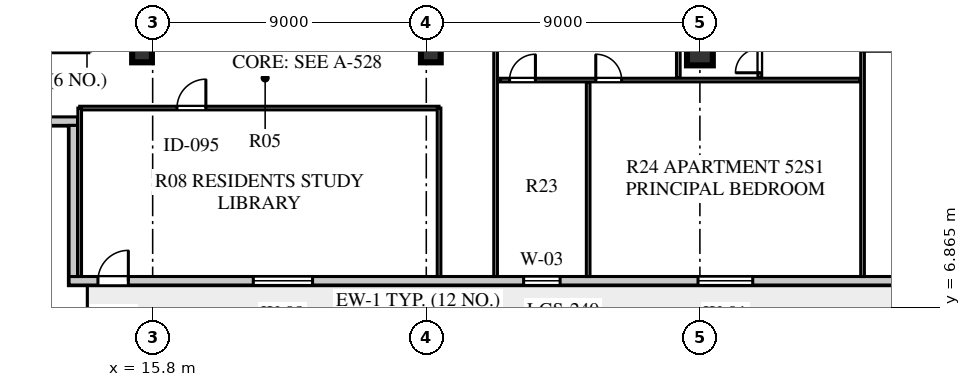
"""IFC4 building model, lengths in metres.
Left out: names, types, materials, properties, quantities, classifications, styles, units other than length and angle.
Written with IfcOpenShell. Run it as: python <this file> out.ifc"""

import sys

from ifc_helpers import new_model, si_unit, direction, frame, frame_2d, origin, origin_2d, place, context, subcontext, project, spatial, rectangle, extrude, element, fill, save


model = new_model("IFC4")
c1 = context("Model", 3, precision=1e-05, world=origin(), true_north=direction((0.0, 1.0)))
c2 = subcontext(c1, "Body", "Model", "MODEL_VIEW")
j1 = project(units=[si_unit("LENGTHUNIT", "METRE"), si_unit("PLANEANGLEUNIT", "RADIAN")], contexts=[c1])
p1 = place(None, origin())
s1 = spatial("IfcSite", under=j1, at=p1, CompositionType="ELEMENT")
p2 = place(p1, origin())
s2 = spatial("IfcBuilding", under=s1, at=p2, CompositionType="ELEMENT")
p3 = place(p2, frame((0.0, 0.0, 214.1)))
s3 = spatial("IfcBuildingStorey", under=s2, at=p3, CompositionType="ELEMENT", Elevation=214.1)
for number, where, z_axis, x_axis in (
    (1, (15.45, 15.25, 0.0), (0.0, 0.0, 1.0), (1.0, 0.0, 0.0)),
    (2, (24.95, 15.25, 0.0), (0.0, 0.0, 1.0), (1.0, 0.0, 0.0)),
):
    element("IfcColumn", number, at=place(p3, frame(where, z_axis=z_axis, x_axis=x_axis)), inside=s3, PredefinedType="COLUMN", context=c2, shape_type="SweptSolid", body=[
        extrude(rectangle(XDim=0.65, YDim=0.65, at=origin_2d()), origin(), (0.0, 0.0, 1.0), 3.66),
    ])
p4 = place(p3, frame((33.8, 15.25, 0.0), z_axis=(0.0, 0.0, 1.0), x_axis=(1.0, 0.0, 0.0)))
e3 = element("IfcColumn", 3, at=p4, inside=s3, PredefinedType="COLUMN", context=c2, shape_type="SweptSolid", body=[
    extrude(rectangle(XDim=0.85, YDim=0.85, at=origin_2d()), origin(), (0.0, 0.0, 1.0), 3.66),
])
p5 = place(p3, frame((13.05, 7.74, 0.0), z_axis=(0.0, 0.0, 1.0), x_axis=(1.0, 0.0, 0.0)))
e4 = element("IfcWall", 4, at=p5, inside=s3, PredefinedType="STANDARD", context=c2, shape_type="SweptSolid", body=[
    extrude(rectangle(XDim=32.5, YDim=0.28, at=frame_2d((16.25, 0.0))), origin(), (0.0, 0.0, 1.0), 3.66),
])
p6 = place(p5, frame((0.95, 0.0, 0.0)))
e5 = element("IfcOpeningElement", 5, at=p6, cuts=e4, PredefinedType="OPENING", context=c2, shape_type="SweptSolid", body=[
    extrude(rectangle(XDim=1.0, YDim=2.05, at=frame_2d((0.5, 1.025))), frame((0.0, 0.15, 0.0), z_axis=(0.0, -1.0, 0.0), x_axis=(1.0, 0.0, 0.0)), (0.0, 0.0, 1.0), 0.3),
])
p7 = place(p5, frame((6.06, 0.0, 0.8)))
e6 = element("IfcOpeningElement", 6, at=p7, cuts=e4, PredefinedType="OPENING", context=c2, shape_type="SweptSolid", body=[
    extrude(rectangle(XDim=1.95, YDim=2.0, at=frame_2d((0.975, 1.0))), frame((0.0, 0.15, 0.0), z_axis=(0.0, -1.0, 0.0), x_axis=(1.0, 0.0, 0.0)), (0.0, 0.0, 1.0), 0.3),
])
p8 = place(p5, frame((14.952, 0.0, 0.8)))
e7 = element("IfcOpeningElement", 7, at=p8, cuts=e4, PredefinedType="OPENING", context=c2, shape_type="SweptSolid", body=[
    extrude(rectangle(XDim=1.2, YDim=1.75, at=frame_2d((0.6, 0.875))), frame((0.0, 0.15, 0.0), z_axis=(0.0, -1.0, 0.0), x_axis=(1.0, 0.0, 0.0)), (0.0, 0.0, 1.0), 0.3),
])
p9 = place(p5, frame((20.688, 0.0, 0.8)))
e8 = element("IfcOpeningElement", 8, at=p9, cuts=e4, PredefinedType="OPENING", context=c2, shape_type="SweptSolid", body=[
    extrude(rectangle(XDim=1.8, YDim=2.0, at=frame_2d((0.9, 1.0))), frame((0.0, 0.15, 0.0), z_axis=(0.0, -1.0, 0.0), x_axis=(1.0, 0.0, 0.0)), (0.0, 0.0, 1.0), 0.3),
])
p10 = place(p5, frame((28.495, 0.0, 0.8)))
e9 = element("IfcOpeningElement", 9, at=p10, cuts=e4, PredefinedType="OPENING", context=c2, shape_type="SweptSolid", body=[
    extrude(rectangle(XDim=1.5, YDim=2.0, at=frame_2d((0.75, 1.0))), frame((0.0, 0.15, 0.0), z_axis=(0.0, -1.0, 0.0), x_axis=(1.0, 0.0, 0.0)), (0.0, 0.0, 1.0), 0.3),
])
p11 = place(p3, frame((7.8, 12.99, 0.0), z_axis=(0.0, 0.0, 1.0), x_axis=(1.0, 0.0, 0.0)))
e10 = element("IfcWall", 10, at=p11, inside=s3, PredefinedType="STANDARD", context=c2, shape_type="SweptSolid", body=[
    extrude(rectangle(XDim=5.53, YDim=0.28, at=frame_2d((2.765, 0.0))), origin(), (0.0, 0.0, 1.0), 3.66),
])
p12 = place(p3, frame((13.19, 12.85, 0.0), z_axis=(0.0, 0.0, 1.0), x_axis=(0.0, -1.0, 0.0)))
e11 = element("IfcWall", 11, at=p12, inside=s3, PredefinedType="STANDARD", context=c2, shape_type="SweptSolid", body=[
    extrude(rectangle(XDim=4.97, YDim=0.28, at=frame_2d((2.485, 0.0))), origin(), (0.0, 0.0, 1.0), 3.66),
])
p13 = place(p3, frame((27.08, 7.88, 0.0), z_axis=(0.0, 0.0, 1.0), x_axis=(0.0, 1.0, 0.0)))
e12 = element("IfcWall", 12, at=p13, inside=s3, PredefinedType="PARTITIONING", context=c2, shape_type="SweptSolid", body=[
    extrude(rectangle(XDim=13.54, YDim=0.12, at=frame_2d((6.77, 0.0))), origin(), (0.0, 0.0, 1.0), 3.66),
])
p14 = place(p3, frame((13.4, 13.42, 0.0), z_axis=(0.0, 0.0, 1.0), x_axis=(1.0, 0.0, 0.0)))
e13 = element("IfcWall", 13, at=p14, inside=s3, PredefinedType="PARTITIONING", context=c2, shape_type="SweptSolid", body=[
    extrude(rectangle(XDim=11.82, YDim=0.12, at=frame_2d((5.91, 0.0))), origin(), (0.0, 0.0, 1.0), 3.66),
])
p15 = place(p14, frame((3.2, 0.0, 0.0)))
e14 = element("IfcOpeningElement", 14, at=p15, cuts=e13, PredefinedType="OPENING", context=c2, shape_type="SweptSolid", body=[
    extrude(rectangle(XDim=0.95, YDim=2.08, at=frame_2d((0.475, 1.04))), frame((0.0, 0.07, 0.0), z_axis=(0.0, -1.0, 0.0), x_axis=(1.0, 0.0, 0.0)), (0.0, 0.0, 1.0), 0.14),
])
p16 = place(p3, frame((13.4, 7.88, 0.0), z_axis=(0.0, 0.0, 1.0), x_axis=(0.0, 1.0, 0.0)))
e15 = element("IfcWall", 15, at=p16, inside=s3, PredefinedType="PARTITIONING", context=c2, shape_type="SweptSolid", body=[
    extrude(rectangle(XDim=5.54, YDim=0.12, at=frame_2d((2.77, 0.0))), origin(), (0.0, 0.0, 1.0), 3.66),
])
p17 = place(p3, frame((25.22, 7.88, 0.0), z_axis=(0.0, 0.0, 1.0), x_axis=(0.0, 1.0, 0.0)))
e16 = element("IfcWall", 16, at=p17, inside=s3, PredefinedType="PARTITIONING", context=c2, shape_type="SweptSolid", body=[
    extrude(rectangle(XDim=5.54, YDim=0.12, at=frame_2d((2.77, 0.0))), origin(), (0.0, 0.0, 1.0), 3.21),
])
p18 = place(p3, frame((8.08, 15.3, 0.0), z_axis=(0.0, 0.0, 1.0), x_axis=(1.0, 0.0, 0.0)))
e17 = element("IfcWall", 17, at=p18, inside=s3, PredefinedType="PARTITIONING", context=c2, shape_type="SweptSolid", body=[
    extrude(rectangle(XDim=5.62, YDim=0.12, at=frame_2d((2.81, 0.0))), origin(), (0.0, 0.0, 1.0), 3.21),
])
p19 = place(p3, frame((39.15, 7.88, 0.0), z_axis=(0.0, 0.0, 1.0), x_axis=(0.0, 1.0, 0.0)))
e18 = element("IfcWall", 18, at=p19, inside=s3, PredefinedType="PARTITIONING", context=c2, shape_type="SweptSolid", body=[
    extrude(rectangle(XDim=13.54, YDim=0.12, at=frame_2d((6.77, 0.0))), origin(), (0.0, 0.0, 1.0), 3.66),
])
p20 = place(p3, frame((27.24, 14.341, 0.0), z_axis=(0.0, 0.0, 1.0), x_axis=(1.0, 0.0, 0.0)))
e19 = element("IfcWall", 19, at=p20, inside=s3, PredefinedType="PARTITIONING", context=c2, shape_type="SweptSolid", body=[
    extrude(rectangle(XDim=11.83, YDim=0.12, at=frame_2d((5.915, 0.0))), origin(), (0.0, 0.0, 1.0), 3.66),
])
p21 = place(p20, frame((0.3, 0.0, 0.0)))
e20 = element("IfcOpeningElement", 20, at=p21, cuts=e19, PredefinedType="OPENING", context=c2, shape_type="SweptSolid", body=[
    extrude(rectangle(XDim=0.85, YDim=2.08, at=frame_2d((0.425, 1.04))), frame((0.0, 0.07, 0.0), z_axis=(0.0, -1.0, 0.0), x_axis=(1.0, 0.0, 0.0)), (0.0, 0.0, 1.0), 0.14),
])
p22 = place(p20, frame((3.135, 0.0, 0.0)))
e21 = element("IfcOpeningElement", 21, at=p22, cuts=e19, PredefinedType="OPENING", context=c2, shape_type="SweptSolid", body=[
    extrude(rectangle(XDim=0.85, YDim=2.08, at=frame_2d((0.425, 1.04))), frame((0.0, 0.07, 0.0), z_axis=(0.0, -1.0, 0.0), x_axis=(1.0, 0.0, 0.0)), (0.0, 0.0, 1.0), 0.14),
])
p23 = place(p3, frame((35.77, 14.421, 0.0), z_axis=(0.0, 0.0, 1.0), x_axis=(0.0, 1.0, 0.0)))
e22 = element("IfcWall", 22, at=p23, inside=s3, PredefinedType="PLUMBINGWALL", context=c2, shape_type="SweptSolid", body=[
    extrude(rectangle(XDim=6.919, YDim=0.125, at=frame_2d((3.459, 0.0))), origin(), (0.0, 0.0, 1.0), 3.66),
])
p24 = place(p23, frame((0.16, 0.0, 0.0)))
e23 = element("IfcOpeningElement", 23, at=p24, cuts=e22, PredefinedType="OPENING", context=c2, shape_type="SweptSolid", body=[
    extrude(rectangle(XDim=0.8, YDim=2.05, at=frame_2d((0.4, 1.025))), frame((0.0, 0.073, 0.0), z_axis=(0.0, -1.0, 0.0), x_axis=(1.0, 0.0, 0.0)), (0.0, 0.0, 1.0), 0.145),
])
p25 = place(p23, frame((3.601, 0.0, 0.0)))
e24 = element("IfcOpeningElement", 24, at=p25, cuts=e22, PredefinedType="OPENING", context=c2, shape_type="SweptSolid", body=[
    extrude(rectangle(XDim=0.85, YDim=2.08, at=frame_2d((0.425, 1.04))), frame((0.0, 0.073, 0.0), z_axis=(0.0, -1.0, 0.0), x_axis=(1.0, 0.0, 0.0)), (0.0, 0.0, 1.0), 0.145),
])
p26 = place(p3, frame((33.09, 14.421, 0.0), z_axis=(0.0, 0.0, 1.0), x_axis=(0.0, 1.0, 0.0)))
e25 = element("IfcWall", 25, at=p26, inside=s3, PredefinedType="PARTITIONING", context=c2, shape_type="SweptSolid", body=[
    extrude(rectangle(XDim=6.919, YDim=0.12, at=frame_2d((3.459, 0.0))), origin(), (0.0, 0.0, 1.0), 3.66),
])
p27 = place(p26, frame((1.45, 0.0, 0.0)))
e26 = element("IfcOpeningElement", 26, at=p27, cuts=e25, PredefinedType="OPENING", context=c2, shape_type="SweptSolid", body=[
    extrude(rectangle(XDim=0.85, YDim=2.08, at=frame_2d((0.425, 1.04))), frame((0.0, 0.07, 0.0), z_axis=(0.0, -1.0, 0.0), x_axis=(1.0, 0.0, 0.0)), (0.0, 0.0, 1.0), 0.14),
])
p28 = place(p3, frame((30.125, 7.88, 0.0), z_axis=(0.0, 0.0, 1.0), x_axis=(0.0, 1.0, 0.0)))
e27 = element("IfcWall", 27, at=p28, inside=s3, PredefinedType="PARTITIONING", context=c2, shape_type="SweptSolid", body=[
    extrude(rectangle(XDim=6.381, YDim=0.12, at=frame_2d((3.19, 0.0))), origin(), (0.0, 0.0, 1.0), 3.66),
])
p29 = place(p6, frame((1.0, 0.0, 0.0), z_axis=(0.0, 0.0, 1.0), x_axis=(-1.0, 0.0, 0.0)))
e28 = element("IfcDoor", 28, at=p29, inside=s3, OperationType="SINGLE_SWING_LEFT", PredefinedType="DOOR", context=c2, shape_type="SweptSolid", body=[
    extrude(rectangle(XDim=1.0, YDim=2.05, at=frame_2d((0.5, 1.025))), frame((0.0, 0.025, 0.0), z_axis=(0.0, -1.0, 0.0), x_axis=(1.0, 0.0, 0.0)), (0.0, 0.0, 1.0), 0.05),
])
fill(e5, e28)
p30 = place(p7, origin())
e29 = element("IfcWindow", 29, at=p30, inside=s3, PartitioningType="SINGLE_PANEL", PredefinedType="WINDOW", context=c2, shape_type="SweptSolid", body=[
    extrude(rectangle(XDim=1.95, YDim=2.0, at=frame_2d((0.975, 1.0))), frame((0.0, 0.03, 0.0), z_axis=(0.0, -1.0, 0.0), x_axis=(1.0, 0.0, 0.0)), (0.0, 0.0, 1.0), 0.06),
])
fill(e6, e29)
p31 = place(p8, origin())
e30 = element("IfcWindow", 30, at=p31, inside=s3, PartitioningType="SINGLE_PANEL", PredefinedType="WINDOW", context=c2, shape_type="SweptSolid", body=[
    extrude(rectangle(XDim=1.2, YDim=1.75, at=frame_2d((0.6, 0.875))), frame((0.0, 0.03, 0.0), z_axis=(0.0, -1.0, 0.0), x_axis=(1.0, 0.0, 0.0)), (0.0, 0.0, 1.0), 0.06),
])
fill(e7, e30)
p32 = place(p9, origin())
e31 = element("IfcWindow", 31, at=p32, inside=s3, PartitioningType="SINGLE_PANEL", PredefinedType="WINDOW", context=c2, shape_type="SweptSolid", body=[
    extrude(rectangle(XDim=1.8, YDim=2.0, at=frame_2d((0.9, 1.0))), frame((0.0, 0.03, 0.0), z_axis=(0.0, -1.0, 0.0), x_axis=(1.0, 0.0, 0.0)), (0.0, 0.0, 1.0), 0.06),
])
fill(e8, e31)
p33 = place(p15, frame((0.95, 0.0, 0.0), z_axis=(0.0, 0.0, 1.0), x_axis=(-1.0, 0.0, 0.0)))
e32 = element("IfcDoor", 32, at=p33, inside=s3, OperationType="SINGLE_SWING_LEFT", PredefinedType="DOOR", context=c2, shape_type="SweptSolid", body=[
    extrude(rectangle(XDim=0.95, YDim=2.08, at=frame_2d((0.475, 1.04))), frame((0.0, 0.025, 0.0), z_axis=(0.0, -1.0, 0.0), x_axis=(1.0, 0.0, 0.0)), (0.0, 0.0, 1.0), 0.05),
])
fill(e14, e32)
p34 = place(p24, origin())
e33 = element("IfcDoor", 33, at=p34, inside=s3, OperationType="SINGLE_SWING_LEFT", PredefinedType="DOOR", context=c2, shape_type="SweptSolid", body=[
    extrude(rectangle(XDim=0.8, YDim=2.05, at=frame_2d((0.4, 1.025))), frame((0.0, 0.025, 0.0), z_axis=(0.0, -1.0, 0.0), x_axis=(1.0, 0.0, 0.0)), (0.0, 0.0, 1.0), 0.05),
])
fill(e23, e33)
p35 = place(p21, frame((0.85, 0.0, 0.0), z_axis=(0.0, 0.0, 1.0), x_axis=(-1.0, 0.0, 0.0)))
e34 = element("IfcDoor", 34, at=p35, inside=s3, OperationType="SINGLE_SWING_LEFT", PredefinedType="DOOR", context=c2, shape_type="SweptSolid", body=[
    extrude(rectangle(XDim=0.85, YDim=2.08, at=frame_2d((0.425, 1.04))), frame((0.0, 0.025, 0.0), z_axis=(0.0, -1.0, 0.0), x_axis=(1.0, 0.0, 0.0)), (0.0, 0.0, 1.0), 0.05),
])
fill(e20, e34)
p36 = place(p22, frame((0.85, 0.0, 0.0), z_axis=(0.0, 0.0, 1.0), x_axis=(-1.0, 0.0, 0.0)))
e35 = element("IfcDoor", 35, at=p36, inside=s3, OperationType="SINGLE_SWING_RIGHT", PredefinedType="DOOR", context=c2, shape_type="SweptSolid", body=[
    extrude(rectangle(XDim=0.85, YDim=2.08, at=frame_2d((0.425, 1.04))), frame((0.0, 0.025, 0.0), z_axis=(0.0, -1.0, 0.0), x_axis=(1.0, 0.0, 0.0)), (0.0, 0.0, 1.0), 0.05),
])
fill(e21, e35)
save(model, sys.argv[1])
